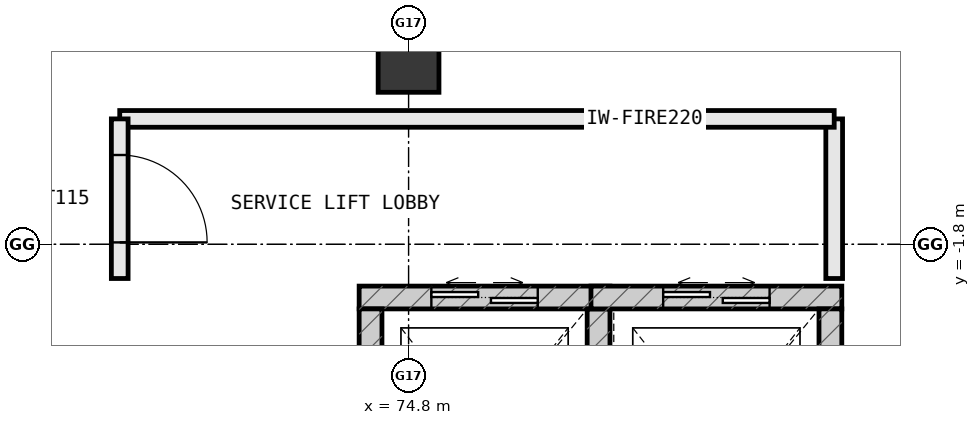
"""IFC4 building model, lengths in metres.
Left out: names, types, materials, properties, quantities, classifications, styles, units other than length and angle.
Written with IfcOpenShell. Run it as: python <this file> out.ifc"""

import sys

from ifc_helpers import new_model, si_unit, direction, frame, frame_2d, origin, origin_2d, place, context, subcontext, project, spatial, rectangle, extrude, element, fill, save


model = new_model("IFC4")
c1 = context("Model", 3, precision=1e-05, world=origin(), true_north=direction((0.0, 1.0)))
c2 = subcontext(c1, "Body", "Model", "MODEL_VIEW")
j1 = project(units=[si_unit("LENGTHUNIT", "METRE"), si_unit("PLANEANGLEUNIT", "RADIAN")], contexts=[c1])
p1 = place(None, origin())
s1 = spatial("IfcSite", under=j1, at=p1, CompositionType="ELEMENT")
p2 = place(p1, origin())
s2 = spatial("IfcBuilding", under=s1, at=p2, CompositionType="ELEMENT")
p3 = place(p2, origin())
s3 = spatial("IfcBuildingStorey", under=s2, at=p3, CompositionType="ELEMENT", Elevation=0.0)
p4 = place(p3, frame((74.8, 0.6, 0.0), z_axis=(0.0, 0.0, 1.0), x_axis=(1.0, 0.0, 0.0)))
e1 = element("IfcColumn", 1, at=p4, inside=s3, PredefinedType="COLUMN", context=c2, shape_type="SweptSolid", body=[
    extrude(rectangle(XDim=0.8, YDim=0.8, at=origin_2d()), origin(), (0.0, 0.0, 1.0), 5.4),
])
p5 = place(p3, frame((77.45, -2.5, 0.0), z_axis=(0.0, 0.0, 1.0), x_axis=(-1.0, 0.0, 0.0)))
e2 = element("IfcWall", 2, at=p5, inside=s3, PredefinedType="SHEAR", context=c2, shape_type="SweptSolid", body=[
    extrude(rectangle(XDim=3.3, YDim=0.3, at=frame_2d((1.65, 0.0))), origin(), (0.0, 0.0, 1.0), 5.4),
])
p6 = place(p5, frame((0.95, 0.0, 0.0)))
e3 = element("IfcOpeningElement", 3, at=p6, cuts=e2, PredefinedType="OPENING", context=c2, shape_type="SweptSolid", body=[
    extrude(rectangle(XDim=1.4, YDim=2.2, at=frame_2d((0.7, 1.1))), frame((0.0, 0.162, 0.0), z_axis=(0.0, -1.0, 0.0), x_axis=(1.0, 0.0, 0.0)), (0.0, 0.0, 1.0), 0.324),
])
for number, where, z_axis, x_axis in (
    (4, (77.3, -5.95, 0.0), (0.0, 0.0, 1.0), (0.0, 1.0, 0.0)),
    (5, (74.3, -2.65, 0.0), (0.0, 0.0, 1.0), (0.0, -1.0, 0.0)),
):
    element("IfcWall", number, at=place(p3, frame(where, z_axis=z_axis, x_axis=x_axis)), inside=s3, PredefinedType="SHEAR", context=c2, shape_type="SweptSolid", body=[
        extrude(rectangle(XDim=3.3, YDim=0.3, at=frame_2d((1.65, 0.0))), origin(), (0.0, 0.0, 1.0), 5.4),
    ])
p7 = place(p3, frame((80.5, -2.5, 0.0), z_axis=(0.0, 0.0, 1.0), x_axis=(-1.0, 0.0, 0.0)))
e6 = element("IfcWall", 6, at=p7, inside=s3, PredefinedType="SHEAR", context=c2, shape_type="SweptSolid", body=[
    extrude(rectangle(XDim=3.3, YDim=0.3, at=frame_2d((1.65, 0.0))), origin(), (0.0, 0.0, 1.0), 5.4),
])
p8 = place(p7, frame((0.95, 0.0, 0.0)))
e7 = element("IfcOpeningElement", 7, at=p8, cuts=e6, PredefinedType="OPENING", context=c2, shape_type="SweptSolid", body=[
    extrude(rectangle(XDim=1.4, YDim=2.2, at=frame_2d((0.7, 1.1))), frame((0.0, 0.162, 0.0), z_axis=(0.0, -1.0, 0.0), x_axis=(1.0, 0.0, 0.0)), (0.0, 0.0, 1.0), 0.324),
])
p9 = place(p3, frame((80.35, -5.95, 0.0), z_axis=(0.0, 0.0, 1.0), x_axis=(0.0, 1.0, 0.0)))
e8 = element("IfcWall", 8, at=p9, inside=s3, PredefinedType="SHEAR", context=c2, shape_type="SweptSolid", body=[
    extrude(rectangle(XDim=3.3, YDim=0.3, at=frame_2d((1.65, 0.0))), origin(), (0.0, 0.0, 1.0), 5.4),
])
p10 = place(p3, frame((80.4, -2.25, 0.0), z_axis=(0.0, 0.0, 1.0), x_axis=(0.0, 1.0, 0.0)))
e9 = element("IfcWall", 9, at=p10, inside=s3, PredefinedType="STANDARD", context=c2, shape_type="SweptSolid", body=[
    extrude(rectangle(XDim=2.1, YDim=0.22, at=frame_2d((1.05, 0.0))), origin(), (0.0, 0.0, 1.0), 5.12),
])
p11 = place(p3, frame((80.4, -0.15, 0.0), z_axis=(0.0, 0.0, 1.0), x_axis=(-1.0, 0.0, 0.0)))
e10 = element("IfcWall", 10, at=p11, inside=s3, PredefinedType="STANDARD", context=c2, shape_type="SweptSolid", body=[
    extrude(rectangle(XDim=9.4, YDim=0.22, at=frame_2d((4.7, 0.0))), origin(), (0.0, 0.0, 1.0), 5.12),
])
p12 = place(p3, frame((71.0, -0.15, 0.0), z_axis=(0.0, 0.0, 1.0), x_axis=(0.0, -1.0, 0.0)))
e11 = element("IfcWall", 11, at=p12, inside=s3, PredefinedType="STANDARD", context=c2, shape_type="SweptSolid", body=[
    extrude(rectangle(XDim=2.1, YDim=0.22, at=frame_2d((1.05, 0.0))), origin(), (0.0, 0.0, 1.0), 5.12),
])
p13 = place(p12, frame((0.475, 0.0, 0.0)))
e12 = element("IfcOpeningElement", 12, at=p13, cuts=e11, PredefinedType="OPENING", context=c2, shape_type="SweptSolid", body=[
    extrude(rectangle(XDim=1.15, YDim=2.2, at=frame_2d((0.575, 1.1))), frame((0.0, 0.122, 0.0), z_axis=(0.0, -1.0, 0.0), x_axis=(1.0, 0.0, 0.0)), (0.0, 0.0, 1.0), 0.244),
])
p14 = place(p6, origin())
e13 = element("IfcDoor", 13, at=p14, inside=s3, OperationType="DOUBLE_DOOR_SLIDING", PredefinedType="DOOR", context=c2, shape_type="SweptSolid", body=[
    extrude(rectangle(XDim=1.4, YDim=2.2, at=frame_2d((0.7, 1.1))), frame((0.0, 0.025, 0.0), z_axis=(0.0, -1.0, 0.0), x_axis=(1.0, 0.0, 0.0)), (0.0, 0.0, 1.0), 0.05),
])
fill(e3, e13)
p15 = place(p8, origin())
e14 = element("IfcDoor", 14, at=p15, inside=s3, OperationType="DOUBLE_DOOR_SLIDING", PredefinedType="DOOR", context=c2, shape_type="SweptSolid", body=[
    extrude(rectangle(XDim=1.4, YDim=2.2, at=frame_2d((0.7, 1.1))), frame((0.0, 0.025, 0.0), z_axis=(0.0, -1.0, 0.0), x_axis=(1.0, 0.0, 0.0)), (0.0, 0.0, 1.0), 0.05),
])
fill(e7, e14)
p16 = place(p13, origin())
e15 = element("IfcDoor", 15, at=p16, inside=s3, OperationType="SINGLE_SWING_RIGHT", PredefinedType="DOOR", context=c2, shape_type="SweptSolid", body=[
    extrude(rectangle(XDim=1.15, YDim=2.2, at=frame_2d((0.575, 1.1))), frame((0.0, 0.025, 0.0), z_axis=(0.0, -1.0, 0.0), x_axis=(1.0, 0.0, 0.0)), (0.0, 0.0, 1.0), 0.05),
])
fill(e12, e15)
save(model, sys.argv[1])
